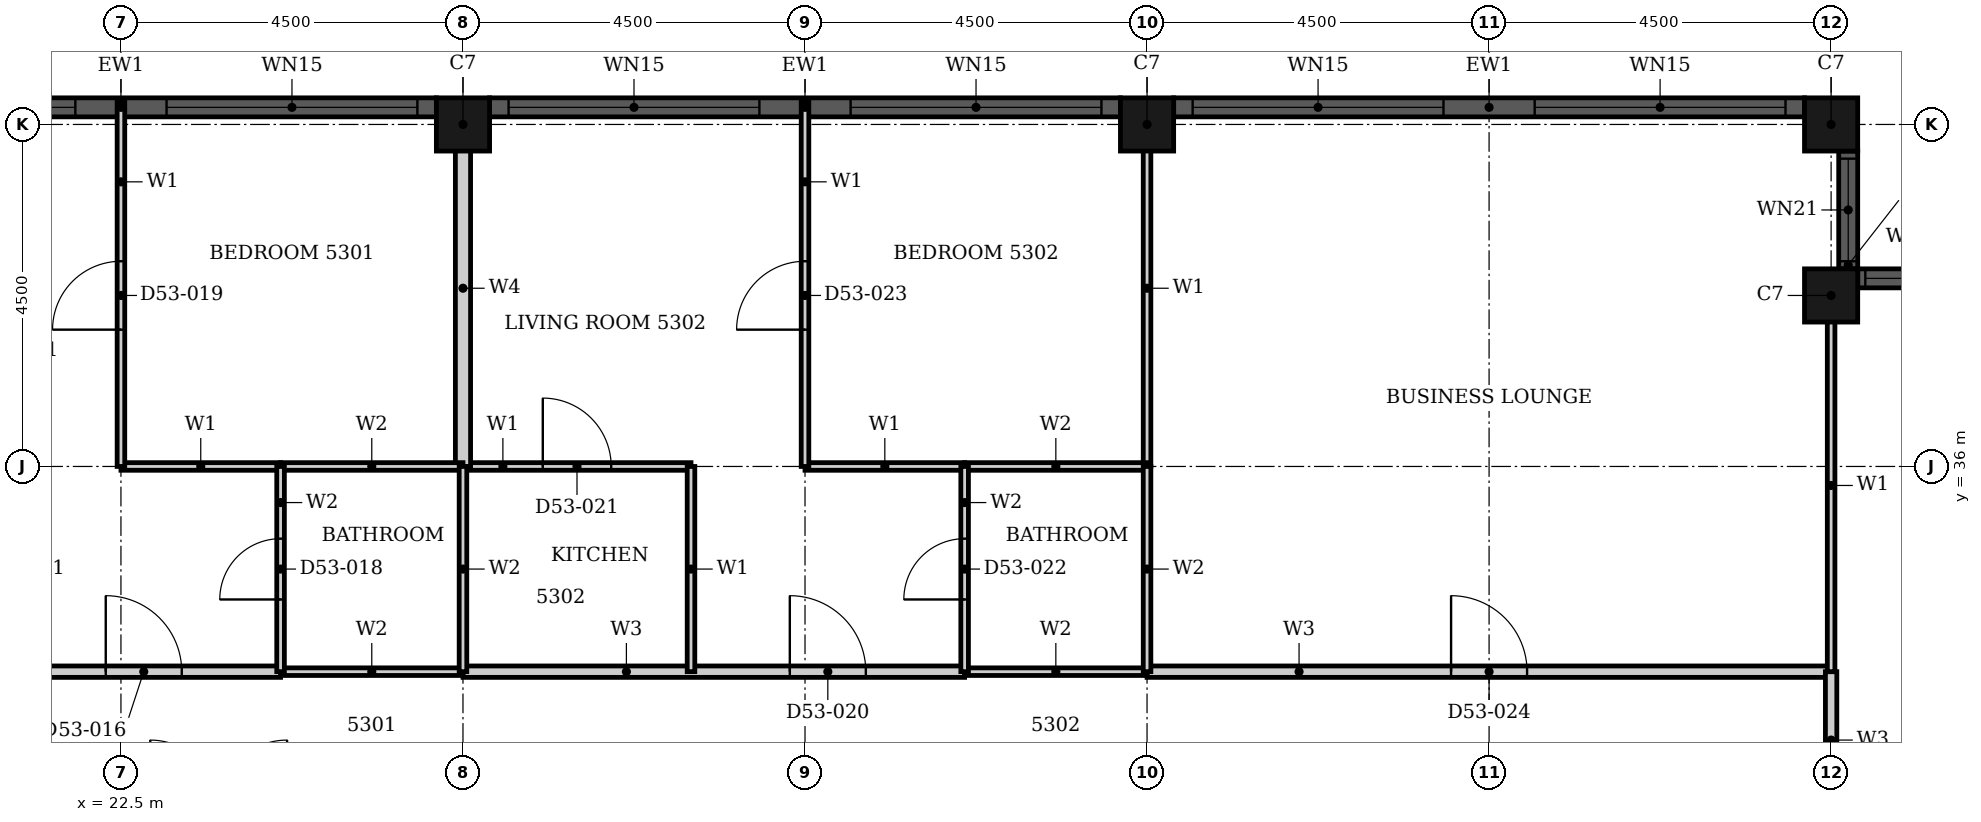
"""IFC4 building model, lengths in metres.
Left out: names, types, materials, properties, quantities, classifications, styles, units other than length and angle.
Written with IfcOpenShell. Run it as: python <this file> out.ifc"""

import sys

from ifc_helpers import new_model, si_unit, direction, frame, frame_2d, origin, origin_2d, place, context, subcontext, project, spatial, rectangle, hollow_rectangle, extrude, element, fill, save


model = new_model("IFC4")
c1 = context("Model", 3, precision=1e-05, world=origin(), true_north=direction((0.0, 1.0)))
c2 = subcontext(c1, "Body", "Model", "MODEL_VIEW")
j1 = project(units=[si_unit("LENGTHUNIT", "METRE"), si_unit("PLANEANGLEUNIT", "RADIAN")], contexts=[c1])
p1 = place(None, origin())
s1 = spatial("IfcSite", under=j1, at=p1, CompositionType="ELEMENT")
p2 = place(p1, origin())
s2 = spatial("IfcBuilding", under=s1, at=p2, CompositionType="ELEMENT")
p3 = place(p2, frame((0.0, 0.0, 210.9)))
s3 = spatial("IfcBuildingStorey", under=s2, at=p3, CompositionType="ELEMENT", Elevation=210.9)
for number, where, z_axis, x_axis in (
    (1, (45.0, 38.25, 0.0), (0.0, 0.0, 1.0), (1.0, 0.0, 0.0)),
    (2, (45.0, 40.5, 0.0), (0.0, 0.0, 1.0), (1.0, 0.0, 0.0)),
    (3, (36.0, 40.5, 0.0), (0.0, 0.0, 1.0), (1.0, 0.0, 0.0)),
    (4, (27.0, 40.5, 0.0), (0.0, 0.0, 1.0), (1.0, 0.0, 0.0)),
):
    element("IfcColumn", number, at=place(p3, frame(where, z_axis=z_axis, x_axis=x_axis)), inside=s3, PredefinedType="COLUMN", context=c2, shape_type="SweptSolid", body=[
        extrude(hollow_rectangle(XDim=0.7, YDim=0.7, WallThickness=0.022, at=origin_2d()), origin(), (0.0, 0.0, 1.0), 3.7),
    ])
p4 = place(p3, frame((46.9, 38.475, 0.0), z_axis=(0.0, 0.0, 1.0), x_axis=(-1.0, 0.0, 0.0)))
e5 = element("IfcWall", 5, at=p4, inside=s3, PredefinedType="SOLIDWALL", context=c2, shape_type="SweptSolid", body=[
    extrude(rectangle(XDim=1.55, YDim=0.25, at=frame_2d((0.775, 0.0))), origin(), (0.0, 0.0, 1.0), 3.7),
])
p5 = place(p4, frame((0.1, 0.0, 0.9)))
e6 = element("IfcOpeningElement", 6, at=p5, cuts=e5, PredefinedType="OPENING", context=c2, shape_type="SweptSolid", body=[
    extrude(rectangle(XDim=1.35, YDim=1.85, at=frame_2d((0.675, 0.925))), frame((0.0, 0.135, 0.0), z_axis=(0.0, -1.0, 0.0), x_axis=(1.0, 0.0, 0.0)), (0.0, 0.0, 1.0), 0.27),
])
p6 = place(p3, frame((45.225, 38.6, 0.0), z_axis=(0.0, 0.0, 1.0), x_axis=(0.0, 1.0, 0.0)))
e7 = element("IfcWall", 7, at=p6, inside=s3, PredefinedType="SOLIDWALL", context=c2, shape_type="SweptSolid", body=[
    extrude(rectangle(XDim=1.55, YDim=0.25, at=frame_2d((0.775, 0.0))), origin(), (0.0, 0.0, 1.0), 3.7),
])
p7 = place(p6, frame((0.1, 0.0, 0.9)))
e8 = element("IfcOpeningElement", 8, at=p7, cuts=e7, PredefinedType="OPENING", context=c2, shape_type="SweptSolid", body=[
    extrude(rectangle(XDim=1.35, YDim=1.85, at=frame_2d((0.675, 0.925))), frame((0.0, 0.135, 0.0), z_axis=(0.0, -1.0, 0.0), x_axis=(1.0, 0.0, 0.0)), (0.0, 0.0, 1.0), 0.27),
])
p8 = place(p3, frame((44.65, 40.725, 0.0), z_axis=(0.0, 0.0, 1.0), x_axis=(-1.0, 0.0, 0.0)))
e9 = element("IfcWall", 9, at=p8, inside=s3, PredefinedType="SOLIDWALL", context=c2, shape_type="SweptSolid", body=[
    extrude(rectangle(XDim=8.3, YDim=0.25, at=frame_2d((4.15, 0.0))), origin(), (0.0, 0.0, 1.0), 3.7),
])
p9 = place(p8, frame((0.25, 0.0, 0.45)))
e10 = element("IfcOpeningElement", 10, at=p9, cuts=e9, PredefinedType="OPENING", context=c2, shape_type="SweptSolid", body=[
    extrude(rectangle(XDim=3.3, YDim=2.3, at=frame_2d((1.65, 1.15))), frame((0.0, 0.135, 0.0), z_axis=(0.0, -1.0, 0.0), x_axis=(1.0, 0.0, 0.0)), (0.0, 0.0, 1.0), 0.27),
])
p10 = place(p8, frame((4.75, 0.0, 0.45)))
e11 = element("IfcOpeningElement", 11, at=p10, cuts=e9, PredefinedType="OPENING", context=c2, shape_type="SweptSolid", body=[
    extrude(rectangle(XDim=3.3, YDim=2.3, at=frame_2d((1.65, 1.15))), frame((0.0, 0.135, 0.0), z_axis=(0.0, -1.0, 0.0), x_axis=(1.0, 0.0, 0.0)), (0.0, 0.0, 1.0), 0.27),
])
p11 = place(p3, frame((35.65, 40.725, 0.0), z_axis=(0.0, 0.0, 1.0), x_axis=(-1.0, 0.0, 0.0)))
e12 = element("IfcWall", 12, at=p11, inside=s3, PredefinedType="SOLIDWALL", context=c2, shape_type="SweptSolid", body=[
    extrude(rectangle(XDim=8.3, YDim=0.25, at=frame_2d((4.15, 0.0))), origin(), (0.0, 0.0, 1.0), 3.7),
])
p12 = place(p11, frame((0.25, 0.0, 0.45)))
e13 = element("IfcOpeningElement", 13, at=p12, cuts=e12, PredefinedType="OPENING", context=c2, shape_type="SweptSolid", body=[
    extrude(rectangle(XDim=3.3, YDim=2.3, at=frame_2d((1.65, 1.15))), frame((0.0, 0.135, 0.0), z_axis=(0.0, -1.0, 0.0), x_axis=(1.0, 0.0, 0.0)), (0.0, 0.0, 1.0), 0.27),
])
p13 = place(p11, frame((4.75, 0.0, 0.45)))
e14 = element("IfcOpeningElement", 14, at=p13, cuts=e12, PredefinedType="OPENING", context=c2, shape_type="SweptSolid", body=[
    extrude(rectangle(XDim=3.3, YDim=2.3, at=frame_2d((1.65, 1.15))), frame((0.0, 0.135, 0.0), z_axis=(0.0, -1.0, 0.0), x_axis=(1.0, 0.0, 0.0)), (0.0, 0.0, 1.0), 0.27),
])
p14 = place(p3, frame((26.65, 40.725, 0.0), z_axis=(0.0, 0.0, 1.0), x_axis=(-1.0, 0.0, 0.0)))
e15 = element("IfcWall", 15, at=p14, inside=s3, PredefinedType="SOLIDWALL", context=c2, shape_type="SweptSolid", body=[
    extrude(rectangle(XDim=8.3, YDim=0.25, at=frame_2d((4.15, 0.0))), origin(), (0.0, 0.0, 1.0), 3.7),
])
p15 = place(p14, frame((0.25, 0.0, 0.45)))
e16 = element("IfcOpeningElement", 16, at=p15, cuts=e15, PredefinedType="OPENING", context=c2, shape_type="SweptSolid", body=[
    extrude(rectangle(XDim=3.3, YDim=2.3, at=frame_2d((1.65, 1.15))), frame((0.0, 0.135, 0.0), z_axis=(0.0, -1.0, 0.0), x_axis=(1.0, 0.0, 0.0)), (0.0, 0.0, 1.0), 0.27),
])
p16 = place(p14, frame((4.75, 0.0, 0.45)))
e17 = element("IfcOpeningElement", 17, at=p16, cuts=e15, PredefinedType="OPENING", context=c2, shape_type="SweptSolid", body=[
    extrude(rectangle(XDim=3.3, YDim=2.3, at=frame_2d((1.65, 1.15))), frame((0.0, 0.135, 0.0), z_axis=(0.0, -1.0, 0.0), x_axis=(1.0, 0.0, 0.0)), (0.0, 0.0, 1.0), 0.27),
])
p17 = place(p3, frame((18.0, 33.3, 0.0), z_axis=(0.0, 0.0, 1.0), x_axis=(1.0, 0.0, 0.0)))
e18 = element("IfcWall", 18, at=p17, inside=s3, PredefinedType="PARTITIONING", context=c2, shape_type="SweptSolid", body=[
    extrude(rectangle(XDim=6.6, YDim=0.15, at=frame_2d((3.3, 0.0))), origin(), (0.0, 0.0, 1.0), 3.4),
])
p18 = place(p17, frame((4.3, 0.0, 0.0)))
e19 = element("IfcOpeningElement", 19, at=p18, cuts=e18, PredefinedType="OPENING", context=c2, shape_type="SweptSolid", body=[
    extrude(rectangle(XDim=1.0, YDim=2.2, at=frame_2d((0.5, 1.1))), frame((0.0, 0.085, 0.0), z_axis=(0.0, -1.0, 0.0), x_axis=(1.0, 0.0, 0.0)), (0.0, 0.0, 1.0), 0.17),
])
p19 = place(p3, frame((27.0, 33.3, 0.0), z_axis=(0.0, 0.0, 1.0), x_axis=(1.0, 0.0, 0.0)))
e20 = element("IfcWall", 20, at=p19, inside=s3, PredefinedType="PARTITIONING", context=c2, shape_type="SweptSolid", body=[
    extrude(rectangle(XDim=6.6, YDim=0.15, at=frame_2d((3.3, 0.0))), origin(), (0.0, 0.0, 1.0), 3.4),
])
p20 = place(p19, frame((4.3, 0.0, 0.0)))
e21 = element("IfcOpeningElement", 21, at=p20, cuts=e20, PredefinedType="OPENING", context=c2, shape_type="SweptSolid", body=[
    extrude(rectangle(XDim=1.0, YDim=2.2, at=frame_2d((0.5, 1.1))), frame((0.0, 0.085, 0.0), z_axis=(0.0, -1.0, 0.0), x_axis=(1.0, 0.0, 0.0)), (0.0, 0.0, 1.0), 0.17),
])
p21 = place(p3, frame((36.0, 33.3, 0.0), z_axis=(0.0, 0.0, 1.0), x_axis=(1.0, 0.0, 0.0)))
e22 = element("IfcWall", 22, at=p21, inside=s3, PredefinedType="PARTITIONING", context=c2, shape_type="SweptSolid", body=[
    extrude(rectangle(XDim=9.0, YDim=0.15, at=frame_2d((4.5, 0.0))), origin(), (0.0, 0.0, 1.0), 3.4),
])
p22 = place(p21, frame((4.0, 0.0, 0.0)))
e23 = element("IfcOpeningElement", 23, at=p22, cuts=e22, PredefinedType="OPENING", context=c2, shape_type="SweptSolid", body=[
    extrude(rectangle(XDim=1.0, YDim=2.1, at=frame_2d((0.5, 1.05))), frame((0.0, 0.085, 0.0), z_axis=(0.0, -1.0, 0.0), x_axis=(1.0, 0.0, 0.0)), (0.0, 0.0, 1.0), 0.17),
])
p23 = place(p3, frame((45.0, 31.5, 0.0), z_axis=(0.0, 0.0, 1.0), x_axis=(0.0, 1.0, 0.0)))
e24 = element("IfcWall", 24, at=p23, inside=s3, PredefinedType="PARTITIONING", context=c2, shape_type="SweptSolid", body=[
    extrude(rectangle(XDim=1.8, YDim=0.15, at=frame_2d((0.9, 0.0))), origin(), (0.0, 0.0, 1.0), 3.4),
])
for number, where, z_axis, x_axis in (
    (25, (22.5, 36.0, 0.0), (0.0, 0.0, 1.0), (1.0, 0.0, 0.0)),
    (26, (31.5, 36.0, 0.0), (0.0, 0.0, 1.0), (1.0, 0.0, 0.0)),
):
    element("IfcWall", number, at=place(p3, frame(where, z_axis=z_axis, x_axis=x_axis)), inside=s3, PredefinedType="PARTITIONING", context=c2, shape_type="SweptSolid", body=[
        extrude(rectangle(XDim=2.1, YDim=0.1, at=frame_2d((1.05, 0.0))), origin(), (0.0, 0.0, 1.0), 3.4),
    ])
p24 = place(p3, frame((27.0, 36.0, 0.0), z_axis=(0.0, 0.0, 1.0), x_axis=(1.0, 0.0, 0.0)))
e27 = element("IfcWall", 27, at=p24, inside=s3, PredefinedType="PARTITIONING", context=c2, shape_type="SweptSolid", body=[
    extrude(rectangle(XDim=3.0, YDim=0.1, at=frame_2d((1.5, 0.0))), origin(), (0.0, 0.0, 1.0), 3.4),
])
p25 = place(p24, frame((1.05, 0.0, 0.0)))
e28 = element("IfcOpeningElement", 28, at=p25, cuts=e27, PredefinedType="OPENING", context=c2, shape_type="SweptSolid", body=[
    extrude(rectangle(XDim=0.9, YDim=2.1, at=frame_2d((0.45, 1.05))), frame((0.0, 0.06, 0.0), z_axis=(0.0, -1.0, 0.0), x_axis=(1.0, 0.0, 0.0)), (0.0, 0.0, 1.0), 0.12),
])
p26 = place(p3, frame((22.5, 36.0, 0.0), z_axis=(0.0, 0.0, 1.0), x_axis=(0.0, 1.0, 0.0)))
e29 = element("IfcWall", 29, at=p26, inside=s3, PredefinedType="PARTITIONING", context=c2, shape_type="SweptSolid", body=[
    extrude(rectangle(XDim=4.79, YDim=0.1, at=frame_2d((2.395, 0.0))), origin(), (0.0, 0.0, 1.0), 3.4),
])
p27 = place(p26, frame((1.8, 0.0, 0.0)))
e30 = element("IfcOpeningElement", 30, at=p27, cuts=e29, PredefinedType="OPENING", context=c2, shape_type="SweptSolid", body=[
    extrude(rectangle(XDim=0.9, YDim=2.1, at=frame_2d((0.45, 1.05))), frame((0.0, 0.06, 0.0), z_axis=(0.0, -1.0, 0.0), x_axis=(1.0, 0.0, 0.0)), (0.0, 0.0, 1.0), 0.12),
])
p28 = place(p3, frame((30.0, 33.3, 0.0), z_axis=(0.0, 0.0, 1.0), x_axis=(0.0, 1.0, 0.0)))
e31 = element("IfcWall", 31, at=p28, inside=s3, PredefinedType="PARTITIONING", context=c2, shape_type="SweptSolid", body=[
    extrude(rectangle(XDim=2.7, YDim=0.1, at=frame_2d((1.35, 0.0))), origin(), (0.0, 0.0, 1.0), 3.4),
])
p29 = place(p3, frame((31.5, 36.0, 0.0), z_axis=(0.0, 0.0, 1.0), x_axis=(0.0, 1.0, 0.0)))
e32 = element("IfcWall", 32, at=p29, inside=s3, PredefinedType="PARTITIONING", context=c2, shape_type="SweptSolid", body=[
    extrude(rectangle(XDim=4.79, YDim=0.1, at=frame_2d((2.395, 0.0))), origin(), (0.0, 0.0, 1.0), 3.4),
])
p30 = place(p29, frame((1.8, 0.0, 0.0)))
e33 = element("IfcOpeningElement", 33, at=p30, cuts=e32, PredefinedType="OPENING", context=c2, shape_type="SweptSolid", body=[
    extrude(rectangle(XDim=0.9, YDim=2.1, at=frame_2d((0.45, 1.05))), frame((0.0, 0.06, 0.0), z_axis=(0.0, -1.0, 0.0), x_axis=(1.0, 0.0, 0.0)), (0.0, 0.0, 1.0), 0.12),
])
p31 = place(p3, frame((36.0, 36.0, 0.0), z_axis=(0.0, 0.0, 1.0), x_axis=(0.0, 1.0, 0.0)))
e34 = element("IfcWall", 34, at=p31, inside=s3, PredefinedType="PARTITIONING", context=c2, shape_type="SweptSolid", body=[
    extrude(rectangle(XDim=4.69, YDim=0.1, at=frame_2d((2.345, 0.0))), origin(), (0.0, 0.0, 1.0), 3.4),
])
p32 = place(p3, frame((45.0, 33.3, 0.0), z_axis=(0.0, 0.0, 1.0), x_axis=(0.0, 1.0, 0.0)))
e35 = element("IfcWall", 35, at=p32, inside=s3, PredefinedType="PARTITIONING", context=c2, shape_type="SweptSolid", body=[
    extrude(rectangle(XDim=4.9, YDim=0.1, at=frame_2d((2.45, 0.0))), origin(), (0.0, 0.0, 1.0), 3.4),
])
p33 = place(p3, frame((27.0, 36.0, 0.0), z_axis=(0.0, 0.0, 1.0), x_axis=(0.0, 1.0, 0.0)))
e36 = element("IfcWall", 36, at=p33, inside=s3, PredefinedType="PARTITIONING", context=c2, shape_type="SweptSolid", body=[
    extrude(rectangle(XDim=4.69, YDim=0.2, at=frame_2d((2.345, 0.0))), origin(), (0.0, 0.0, 1.0), 3.4),
])
for number, where, z_axis, x_axis in (
    (37, (24.6, 33.3, 0.0), (0.0, 0.0, 1.0), (1.0, 0.0, 0.0)),
    (38, (33.6, 33.3, 0.0), (0.0, 0.0, 1.0), (1.0, 0.0, 0.0)),
    (39, (24.6, 36.0, 0.0), (0.0, 0.0, 1.0), (1.0, 0.0, 0.0)),
    (40, (33.6, 36.0, 0.0), (0.0, 0.0, 1.0), (1.0, 0.0, 0.0)),
):
    element("IfcWall", number, at=place(p3, frame(where, z_axis=z_axis, x_axis=x_axis)), inside=s3, PredefinedType="PARTITIONING", context=c2, shape_type="SweptSolid", body=[
        extrude(rectangle(XDim=2.4, YDim=0.1, at=frame_2d((1.2, 0.0))), origin(), (0.0, 0.0, 1.0), 3.4),
    ])
p34 = place(p3, frame((24.6, 33.3, 0.0), z_axis=(0.0, 0.0, 1.0), x_axis=(0.0, 1.0, 0.0)))
e41 = element("IfcWall", 41, at=p34, inside=s3, PredefinedType="PARTITIONING", context=c2, shape_type="SweptSolid", body=[
    extrude(rectangle(XDim=2.7, YDim=0.1, at=frame_2d((1.35, 0.0))), origin(), (0.0, 0.0, 1.0), 3.4),
])
p35 = place(p34, frame((0.95, 0.0, 0.0)))
e42 = element("IfcOpeningElement", 42, at=p35, cuts=e41, PredefinedType="OPENING", context=c2, shape_type="SweptSolid", body=[
    extrude(rectangle(XDim=0.8, YDim=2.1, at=frame_2d((0.4, 1.05))), frame((0.0, 0.06, 0.0), z_axis=(0.0, -1.0, 0.0), x_axis=(1.0, 0.0, 0.0)), (0.0, 0.0, 1.0), 0.12),
])
p36 = place(p3, frame((27.0, 33.3, 0.0), z_axis=(0.0, 0.0, 1.0), x_axis=(0.0, 1.0, 0.0)))
e43 = element("IfcWall", 43, at=p36, inside=s3, PredefinedType="PARTITIONING", context=c2, shape_type="SweptSolid", body=[
    extrude(rectangle(XDim=2.7, YDim=0.1, at=frame_2d((1.35, 0.0))), origin(), (0.0, 0.0, 1.0), 3.4),
])
p37 = place(p3, frame((33.6, 33.3, 0.0), z_axis=(0.0, 0.0, 1.0), x_axis=(0.0, 1.0, 0.0)))
e44 = element("IfcWall", 44, at=p37, inside=s3, PredefinedType="PARTITIONING", context=c2, shape_type="SweptSolid", body=[
    extrude(rectangle(XDim=2.7, YDim=0.1, at=frame_2d((1.35, 0.0))), origin(), (0.0, 0.0, 1.0), 3.4),
])
p38 = place(p37, frame((0.95, 0.0, 0.0)))
e45 = element("IfcOpeningElement", 45, at=p38, cuts=e44, PredefinedType="OPENING", context=c2, shape_type="SweptSolid", body=[
    extrude(rectangle(XDim=0.8, YDim=2.1, at=frame_2d((0.4, 1.05))), frame((0.0, 0.06, 0.0), z_axis=(0.0, -1.0, 0.0), x_axis=(1.0, 0.0, 0.0)), (0.0, 0.0, 1.0), 0.12),
])
p39 = place(p3, frame((36.0, 33.3, 0.0), z_axis=(0.0, 0.0, 1.0), x_axis=(0.0, 1.0, 0.0)))
e46 = element("IfcWall", 46, at=p39, inside=s3, PredefinedType="PARTITIONING", context=c2, shape_type="SweptSolid", body=[
    extrude(rectangle(XDim=2.7, YDim=0.1, at=frame_2d((1.35, 0.0))), origin(), (0.0, 0.0, 1.0), 3.4),
])
p40 = place(p5, origin())
e47 = element("IfcWindow", 47, at=p40, inside=s3, PartitioningType="SINGLE_PANEL", PredefinedType="WINDOW", context=c2, shape_type="SweptSolid", body=[
    extrude(rectangle(XDim=1.35, YDim=1.85, at=frame_2d((0.675, 0.925))), frame((0.0, 0.03, 0.0), z_axis=(0.0, -1.0, 0.0), x_axis=(1.0, 0.0, 0.0)), (0.0, 0.0, 1.0), 0.06),
])
fill(e6, e47)
p41 = place(p7, origin())
e48 = element("IfcWindow", 48, at=p41, inside=s3, PartitioningType="SINGLE_PANEL", PredefinedType="WINDOW", context=c2, shape_type="SweptSolid", body=[
    extrude(rectangle(XDim=1.35, YDim=1.85, at=frame_2d((0.675, 0.925))), frame((0.0, 0.03, 0.0), z_axis=(0.0, -1.0, 0.0), x_axis=(1.0, 0.0, 0.0)), (0.0, 0.0, 1.0), 0.06),
])
fill(e8, e48)
p42 = place(p9, origin())
e49 = element("IfcWindow", 49, at=p42, inside=s3, PartitioningType="SINGLE_PANEL", PredefinedType="WINDOW", context=c2, shape_type="SweptSolid", body=[
    extrude(rectangle(XDim=3.3, YDim=2.3, at=frame_2d((1.65, 1.15))), frame((0.0, 0.03, 0.0), z_axis=(0.0, -1.0, 0.0), x_axis=(1.0, 0.0, 0.0)), (0.0, 0.0, 1.0), 0.06),
])
fill(e10, e49)
p43 = place(p10, origin())
e50 = element("IfcWindow", 50, at=p43, inside=s3, PartitioningType="SINGLE_PANEL", PredefinedType="WINDOW", context=c2, shape_type="SweptSolid", body=[
    extrude(rectangle(XDim=3.3, YDim=2.3, at=frame_2d((1.65, 1.15))), frame((0.0, 0.03, 0.0), z_axis=(0.0, -1.0, 0.0), x_axis=(1.0, 0.0, 0.0)), (0.0, 0.0, 1.0), 0.06),
])
fill(e11, e50)
p44 = place(p12, origin())
e51 = element("IfcWindow", 51, at=p44, inside=s3, PartitioningType="SINGLE_PANEL", PredefinedType="WINDOW", context=c2, shape_type="SweptSolid", body=[
    extrude(rectangle(XDim=3.3, YDim=2.3, at=frame_2d((1.65, 1.15))), frame((0.0, 0.03, 0.0), z_axis=(0.0, -1.0, 0.0), x_axis=(1.0, 0.0, 0.0)), (0.0, 0.0, 1.0), 0.06),
])
fill(e13, e51)
p45 = place(p13, origin())
e52 = element("IfcWindow", 52, at=p45, inside=s3, PartitioningType="SINGLE_PANEL", PredefinedType="WINDOW", context=c2, shape_type="SweptSolid", body=[
    extrude(rectangle(XDim=3.3, YDim=2.3, at=frame_2d((1.65, 1.15))), frame((0.0, 0.03, 0.0), z_axis=(0.0, -1.0, 0.0), x_axis=(1.0, 0.0, 0.0)), (0.0, 0.0, 1.0), 0.06),
])
fill(e14, e52)
p46 = place(p15, origin())
e53 = element("IfcWindow", 53, at=p46, inside=s3, PartitioningType="SINGLE_PANEL", PredefinedType="WINDOW", context=c2, shape_type="SweptSolid", body=[
    extrude(rectangle(XDim=3.3, YDim=2.3, at=frame_2d((1.65, 1.15))), frame((0.0, 0.03, 0.0), z_axis=(0.0, -1.0, 0.0), x_axis=(1.0, 0.0, 0.0)), (0.0, 0.0, 1.0), 0.06),
])
fill(e16, e53)
p47 = place(p16, origin())
e54 = element("IfcWindow", 54, at=p47, inside=s3, PartitioningType="SINGLE_PANEL", PredefinedType="WINDOW", context=c2, shape_type="SweptSolid", body=[
    extrude(rectangle(XDim=3.3, YDim=2.3, at=frame_2d((1.65, 1.15))), frame((0.0, 0.03, 0.0), z_axis=(0.0, -1.0, 0.0), x_axis=(1.0, 0.0, 0.0)), (0.0, 0.0, 1.0), 0.06),
])
fill(e17, e54)
p48 = place(p18, origin())
e55 = element("IfcDoor", 55, at=p48, inside=s3, OperationType="SINGLE_SWING_RIGHT", PredefinedType="DOOR", context=c2, shape_type="SweptSolid", body=[
    extrude(rectangle(XDim=1.0, YDim=2.2, at=frame_2d((0.5, 1.1))), frame((0.0, 0.025, 0.0), z_axis=(0.0, -1.0, 0.0), x_axis=(1.0, 0.0, 0.0)), (0.0, 0.0, 1.0), 0.05),
])
fill(e19, e55)
p49 = place(p35, origin())
e56 = element("IfcDoor", 56, at=p49, inside=s3, OperationType="SINGLE_SWING_RIGHT", PredefinedType="DOOR", context=c2, shape_type="SweptSolid", body=[
    extrude(rectangle(XDim=0.8, YDim=2.1, at=frame_2d((0.4, 1.05))), frame((0.0, 0.025, 0.0), z_axis=(0.0, -1.0, 0.0), x_axis=(1.0, 0.0, 0.0)), (0.0, 0.0, 1.0), 0.05),
])
fill(e42, e56)
p50 = place(p27, origin())
e57 = element("IfcDoor", 57, at=p50, inside=s3, OperationType="SINGLE_SWING_LEFT", PredefinedType="DOOR", context=c2, shape_type="SweptSolid", body=[
    extrude(rectangle(XDim=0.9, YDim=2.1, at=frame_2d((0.45, 1.05))), frame((0.0, 0.025, 0.0), z_axis=(0.0, -1.0, 0.0), x_axis=(1.0, 0.0, 0.0)), (0.0, 0.0, 1.0), 0.05),
])
fill(e30, e57)
p51 = place(p20, origin())
e58 = element("IfcDoor", 58, at=p51, inside=s3, OperationType="SINGLE_SWING_RIGHT", PredefinedType="DOOR", context=c2, shape_type="SweptSolid", body=[
    extrude(rectangle(XDim=1.0, YDim=2.2, at=frame_2d((0.5, 1.1))), frame((0.0, 0.025, 0.0), z_axis=(0.0, -1.0, 0.0), x_axis=(1.0, 0.0, 0.0)), (0.0, 0.0, 1.0), 0.05),
])
fill(e21, e58)
p52 = place(p25, origin())
e59 = element("IfcDoor", 59, at=p52, inside=s3, OperationType="SINGLE_SWING_RIGHT", PredefinedType="DOOR", context=c2, shape_type="SweptSolid", body=[
    extrude(rectangle(XDim=0.9, YDim=2.1, at=frame_2d((0.45, 1.05))), frame((0.0, 0.025, 0.0), z_axis=(0.0, -1.0, 0.0), x_axis=(1.0, 0.0, 0.0)), (0.0, 0.0, 1.0), 0.05),
])
fill(e28, e59)
p53 = place(p38, origin())
e60 = element("IfcDoor", 60, at=p53, inside=s3, OperationType="SINGLE_SWING_LEFT", PredefinedType="DOOR", context=c2, shape_type="SweptSolid", body=[
    extrude(rectangle(XDim=0.8, YDim=2.1, at=frame_2d((0.4, 1.05))), frame((0.0, 0.025, 0.0), z_axis=(0.0, -1.0, 0.0), x_axis=(1.0, 0.0, 0.0)), (0.0, 0.0, 1.0), 0.05),
])
fill(e45, e60)
p54 = place(p30, origin())
e61 = element("IfcDoor", 61, at=p54, inside=s3, OperationType="SINGLE_SWING_RIGHT", PredefinedType="DOOR", context=c2, shape_type="SweptSolid", body=[
    extrude(rectangle(XDim=0.9, YDim=2.1, at=frame_2d((0.45, 1.05))), frame((0.0, 0.025, 0.0), z_axis=(0.0, -1.0, 0.0), x_axis=(1.0, 0.0, 0.0)), (0.0, 0.0, 1.0), 0.05),
])
fill(e33, e61)
p55 = place(p22, origin())
e62 = element("IfcDoor", 62, at=p55, inside=s3, OperationType="SINGLE_SWING_RIGHT", PredefinedType="DOOR", context=c2, shape_type="SweptSolid", body=[
    extrude(rectangle(XDim=1.0, YDim=2.1, at=frame_2d((0.5, 1.05))), frame((0.0, 0.025, 0.0), z_axis=(0.0, -1.0, 0.0), x_axis=(1.0, 0.0, 0.0)), (0.0, 0.0, 1.0), 0.05),
])
fill(e23, e62)
save(model, sys.argv[1])
